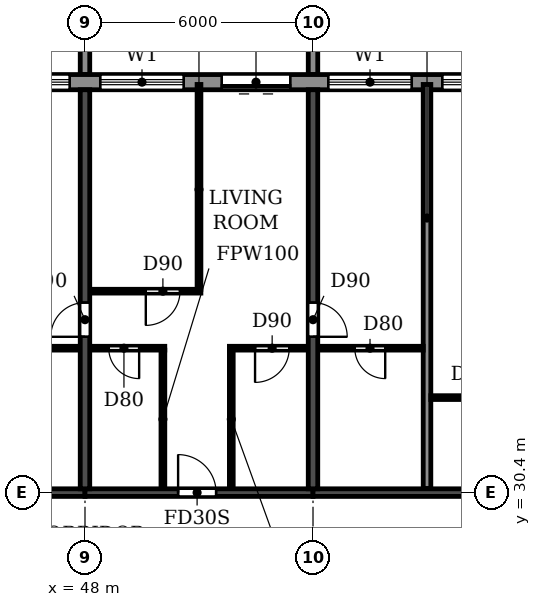
"""IFC4 building model, lengths in metres.
Left out: names, types, materials, properties, quantities, classifications, styles, units other than length and angle.
Written with IfcOpenShell. Run it as: python <this file> out.ifc"""

import sys

from ifc_helpers import new_model, si_unit, direction, frame, frame_2d, origin, place, context, subcontext, project, spatial, polyline, rectangle, outline, extrude, source, transform, mapped, element, fill, save


model = new_model("IFC4")
c1 = context("Model", 3, precision=1e-05, world=origin(), true_north=direction((0.0, 1.0)))
c2 = subcontext(c1, "Body", "Model", "MODEL_VIEW")
j1 = project(units=[si_unit("LENGTHUNIT", "METRE"), si_unit("PLANEANGLEUNIT", "RADIAN")], contexts=[c1])
p1 = place(None, origin())
s1 = spatial("IfcSite", under=j1, at=p1, CompositionType="ELEMENT")
p2 = place(p1, origin())
s2 = spatial("IfcBuilding", under=s1, at=p2, CompositionType="ELEMENT")
p3 = place(p2, frame((0.0, 0.0, 221.4)))
s3 = spatial("IfcBuildingStorey", under=s2, at=p3, CompositionType="ELEMENT", Elevation=221.4)
p4 = place(p3, frame((48.0, 30.5, 0.0), z_axis=(0.0, 0.0, 1.0), x_axis=(0.0, 1.0, 0.0)))
e1 = element("IfcWall", 1, at=p4, inside=s3, PredefinedType="SHEAR", context=c2, shape_type="SweptSolid", body=[
    extrude(rectangle(XDim=10.5, YDim=0.25, at=frame_2d((5.25, 0.0))), origin(), (0.0, 0.0, 1.0), 3.08),
])
p5 = place(p4, frame((4.0, 0.0, 0.0)))
e2 = element("IfcOpeningElement", 2, at=p5, cuts=e1, PredefinedType="OPENING", context=c2, shape_type="SweptSolid", body=[
    extrude(rectangle(XDim=0.9, YDim=2.1, at=frame_2d((0.45, 1.05))), frame((0.0, 0.135, 0.0), z_axis=(0.0, -1.0, 0.0), x_axis=(1.0, 0.0, 0.0)), (0.0, 0.0, 1.0), 0.27),
])
p6 = place(p3, frame((54.0, 30.5, 0.0), z_axis=(0.0, 0.0, 1.0), x_axis=(0.0, 1.0, 0.0)))
e3 = element("IfcWall", 3, at=p6, inside=s3, PredefinedType="SHEAR", context=c2, shape_type="SweptSolid", body=[
    extrude(rectangle(XDim=10.5, YDim=0.25, at=frame_2d((5.25, 0.0))), origin(), (0.0, 0.0, 1.0), 3.08),
])
p7 = place(p6, frame((4.0, 0.0, 0.0)))
e4 = element("IfcOpeningElement", 4, at=p7, cuts=e3, PredefinedType="OPENING", context=c2, shape_type="SweptSolid", body=[
    extrude(rectangle(XDim=0.9, YDim=2.1, at=frame_2d((0.45, 1.05))), frame((0.0, 0.135, 0.0), z_axis=(0.0, -1.0, 0.0), x_axis=(1.0, 0.0, 0.0)), (0.0, 0.0, 1.0), 0.27),
])
p8 = place(p3, frame((42.0, 30.4, 0.0), z_axis=(0.0, 0.0, 1.0), x_axis=(1.0, 0.0, 0.0)))
e5 = element("IfcWall", 5, at=p8, inside=s3, PredefinedType="SHEAR", context=c2, shape_type="SweptSolid", body=[
    extrude(rectangle(XDim=6.0, YDim=0.2, at=frame_2d((3.0, 0.0))), origin(), (0.0, 0.0, 1.0), 2.48),
])
p9 = place(p3, frame((48.0, 30.4, 0.0), z_axis=(0.0, 0.0, 1.0), x_axis=(1.0, 0.0, 0.0)))
e6 = element("IfcWall", 6, at=p9, inside=s3, PredefinedType="SHEAR", context=c2, shape_type="SweptSolid", body=[
    extrude(rectangle(XDim=6.0, YDim=0.2, at=frame_2d((3.0, 0.0))), origin(), (0.0, 0.0, 1.0), 2.48),
])
p10 = place(p9, frame((2.45, 0.0, 0.0)))
e7 = element("IfcOpeningElement", 7, at=p10, cuts=e6, PredefinedType="OPENING", context=c2, shape_type="SweptSolid", body=[
    extrude(rectangle(XDim=1.0, YDim=2.1, at=frame_2d((0.5, 1.05))), frame((0.0, 0.11, 0.0), z_axis=(0.0, -1.0, 0.0), x_axis=(1.0, 0.0, 0.0)), (0.0, 0.0, 1.0), 0.22),
])
p11 = place(p3, frame((54.0, 30.4, 0.0), z_axis=(0.0, 0.0, 1.0), x_axis=(1.0, 0.0, 0.0)))
e8 = element("IfcWall", 8, at=p11, inside=s3, PredefinedType="SHEAR", context=c2, shape_type="SweptSolid", body=[
    extrude(rectangle(XDim=6.0, YDim=0.2, at=frame_2d((3.0, 0.0))), origin(), (0.0, 0.0, 1.0), 2.48),
])
p12 = place(p3, frame((79.317, 41.2, 0.0), z_axis=(0.0, 0.0, 1.0), x_axis=(-1.0, 0.0, 0.0)))
e9 = element("IfcWall", 9, at=p12, inside=s3, PredefinedType="STANDARD", context=c2, shape_type="SweptSolid", body=[
    extrude(rectangle(XDim=56.634, YDim=0.4, at=frame_2d((28.317, 0.0))), origin(), (0.0, 0.0, 1.0), 3.08),
])
p13 = place(p12, frame((52.717, 0.0, 0.9)))
e10 = element("IfcOpeningElement", 10, at=p13, cuts=e9, PredefinedType="OPENING", context=c2, shape_type="SweptSolid", body=[
    extrude(rectangle(XDim=2.2, YDim=1.5, at=frame_2d((1.1, 0.75))), frame((0.0, 0.21, 0.0), z_axis=(0.0, -1.0, 0.0), x_axis=(1.0, 0.0, 0.0)), (0.0, 0.0, 1.0), 0.42),
])
p14 = place(p12, frame((49.717, 0.0, 0.9)))
e11 = element("IfcOpeningElement", 11, at=p14, cuts=e9, PredefinedType="OPENING", context=c2, shape_type="SweptSolid", body=[
    extrude(rectangle(XDim=2.2, YDim=1.5, at=frame_2d((1.1, 0.75))), frame((0.0, 0.21, 0.0), z_axis=(0.0, -1.0, 0.0), x_axis=(1.0, 0.0, 0.0)), (0.0, 0.0, 1.0), 0.42),
])
p15 = place(p12, frame((46.917, 0.0, 0.0)))
e12 = element("IfcOpeningElement", 12, at=p15, cuts=e9, PredefinedType="OPENING", context=c2, shape_type="SweptSolid", body=[
    extrude(rectangle(XDim=1.8, YDim=2.4, at=frame_2d((0.9, 1.2))), frame((0.0, 0.21, 0.0), z_axis=(0.0, -1.0, 0.0), x_axis=(1.0, 0.0, 0.0)), (0.0, 0.0, 1.0), 0.42),
])
p16 = place(p12, frame((43.717, 0.0, 0.9)))
e13 = element("IfcOpeningElement", 13, at=p16, cuts=e9, PredefinedType="OPENING", context=c2, shape_type="SweptSolid", body=[
    extrude(rectangle(XDim=2.2, YDim=1.5, at=frame_2d((1.1, 0.75))), frame((0.0, 0.21, 0.0), z_axis=(0.0, -1.0, 0.0), x_axis=(1.0, 0.0, 0.0)), (0.0, 0.0, 1.0), 0.42),
])
p17 = place(p12, frame((40.717, 0.0, 0.9)))
e14 = element("IfcOpeningElement", 14, at=p17, cuts=e9, PredefinedType="OPENING", context=c2, shape_type="SweptSolid", body=[
    extrude(rectangle(XDim=2.2, YDim=1.5, at=frame_2d((1.1, 0.75))), frame((0.0, 0.21, 0.0), z_axis=(0.0, -1.0, 0.0), x_axis=(1.0, 0.0, 0.0)), (0.0, 0.0, 1.0), 0.42),
])
p18 = place(p12, frame((37.917, 0.0, 0.0)))
e15 = element("IfcOpeningElement", 15, at=p18, cuts=e9, PredefinedType="OPENING", context=c2, shape_type="SweptSolid", body=[
    extrude(rectangle(XDim=1.8, YDim=2.4, at=frame_2d((0.9, 1.2))), frame((0.0, 0.21, 0.0), z_axis=(0.0, -1.0, 0.0), x_axis=(1.0, 0.0, 0.0)), (0.0, 0.0, 1.0), 0.42),
])
p19 = place(p12, frame((34.717, 0.0, 0.9)))
e16 = element("IfcOpeningElement", 16, at=p19, cuts=e9, PredefinedType="OPENING", context=c2, shape_type="SweptSolid", body=[
    extrude(rectangle(XDim=2.2, YDim=1.5, at=frame_2d((1.1, 0.75))), frame((0.0, 0.21, 0.0), z_axis=(0.0, -1.0, 0.0), x_axis=(1.0, 0.0, 0.0)), (0.0, 0.0, 1.0), 0.42),
])
p20 = place(p12, frame((31.717, 0.0, 0.9)))
e17 = element("IfcOpeningElement", 17, at=p20, cuts=e9, PredefinedType="OPENING", context=c2, shape_type="SweptSolid", body=[
    extrude(rectangle(XDim=2.2, YDim=1.5, at=frame_2d((1.1, 0.75))), frame((0.0, 0.21, 0.0), z_axis=(0.0, -1.0, 0.0), x_axis=(1.0, 0.0, 0.0)), (0.0, 0.0, 1.0), 0.42),
])
p21 = place(p12, frame((28.717, 0.0, 0.9)))
e18 = element("IfcOpeningElement", 18, at=p21, cuts=e9, PredefinedType="OPENING", context=c2, shape_type="SweptSolid", body=[
    extrude(rectangle(XDim=2.2, YDim=1.5, at=frame_2d((1.1, 0.75))), frame((0.0, 0.21, 0.0), z_axis=(0.0, -1.0, 0.0), x_axis=(1.0, 0.0, 0.0)), (0.0, 0.0, 1.0), 0.42),
])
p22 = place(p12, frame((25.917, 0.0, 0.0)))
e19 = element("IfcOpeningElement", 19, at=p22, cuts=e9, PredefinedType="OPENING", context=c2, shape_type="SweptSolid", body=[
    extrude(rectangle(XDim=1.8, YDim=2.4, at=frame_2d((0.9, 1.2))), frame((0.0, 0.21, 0.0), z_axis=(0.0, -1.0, 0.0), x_axis=(1.0, 0.0, 0.0)), (0.0, 0.0, 1.0), 0.42),
])
p23 = place(p12, frame((22.717, 0.0, 0.9)))
e20 = element("IfcOpeningElement", 20, at=p23, cuts=e9, PredefinedType="OPENING", context=c2, shape_type="SweptSolid", body=[
    extrude(rectangle(XDim=2.2, YDim=1.5, at=frame_2d((1.1, 0.75))), frame((0.0, 0.21, 0.0), z_axis=(0.0, -1.0, 0.0), x_axis=(1.0, 0.0, 0.0)), (0.0, 0.0, 1.0), 0.42),
])
p24 = place(p12, frame((19.717, 0.0, 0.9)))
e21 = element("IfcOpeningElement", 21, at=p24, cuts=e9, PredefinedType="OPENING", context=c2, shape_type="SweptSolid", body=[
    extrude(rectangle(XDim=2.2, YDim=1.5, at=frame_2d((1.1, 0.75))), frame((0.0, 0.21, 0.0), z_axis=(0.0, -1.0, 0.0), x_axis=(1.0, 0.0, 0.0)), (0.0, 0.0, 1.0), 0.42),
])
p25 = place(p12, frame((16.717, 0.0, 0.9)))
e22 = element("IfcOpeningElement", 22, at=p25, cuts=e9, PredefinedType="OPENING", context=c2, shape_type="SweptSolid", body=[
    extrude(rectangle(XDim=2.2, YDim=1.5, at=frame_2d((1.1, 0.75))), frame((0.0, 0.21, 0.0), z_axis=(0.0, -1.0, 0.0), x_axis=(1.0, 0.0, 0.0)), (0.0, 0.0, 1.0), 0.42),
])
p26 = place(p12, frame((13.917, 0.0, 0.0)))
e23 = element("IfcOpeningElement", 23, at=p26, cuts=e9, PredefinedType="OPENING", context=c2, shape_type="SweptSolid", body=[
    extrude(rectangle(XDim=1.8, YDim=2.4, at=frame_2d((0.9, 1.2))), frame((0.0, 0.21, 0.0), z_axis=(0.0, -1.0, 0.0), x_axis=(1.0, 0.0, 0.0)), (0.0, 0.0, 1.0), 0.42),
])
p27 = place(p12, frame((10.717, 0.0, 0.9)))
e24 = element("IfcOpeningElement", 24, at=p27, cuts=e9, PredefinedType="OPENING", context=c2, shape_type="SweptSolid", body=[
    extrude(rectangle(XDim=2.2, YDim=1.5, at=frame_2d((1.1, 0.75))), frame((0.0, 0.21, 0.0), z_axis=(0.0, -1.0, 0.0), x_axis=(1.0, 0.0, 0.0)), (0.0, 0.0, 1.0), 0.42),
])
p28 = place(p12, frame((7.917, 0.0, 0.0)))
e25 = element("IfcOpeningElement", 25, at=p28, cuts=e9, PredefinedType="OPENING", context=c2, shape_type="SweptSolid", body=[
    extrude(rectangle(XDim=1.8, YDim=2.4, at=frame_2d((0.9, 1.2))), frame((0.0, 0.21, 0.0), z_axis=(0.0, -1.0, 0.0), x_axis=(1.0, 0.0, 0.0)), (0.0, 0.0, 1.0), 0.42),
])
p29 = place(p12, frame((4.717, 0.0, 0.9)))
e26 = element("IfcOpeningElement", 26, at=p29, cuts=e9, PredefinedType="OPENING", context=c2, shape_type="SweptSolid", body=[
    extrude(rectangle(XDim=2.2, YDim=1.5, at=frame_2d((1.1, 0.75))), frame((0.0, 0.21, 0.0), z_axis=(0.0, -1.0, 0.0), x_axis=(1.0, 0.0, 0.0)), (0.0, 0.0, 1.0), 0.42),
])
p30 = place(p12, frame((1.917, 0.0, 0.0)))
e27 = element("IfcOpeningElement", 27, at=p30, cuts=e9, PredefinedType="OPENING", context=c2, shape_type="SweptSolid", body=[
    extrude(rectangle(XDim=1.8, YDim=2.4, at=frame_2d((0.9, 1.2))), frame((0.0, 0.21, 0.0), z_axis=(0.0, -1.0, 0.0), x_axis=(1.0, 0.0, 0.0)), (0.0, 0.0, 1.0), 0.42),
])
m1 = source(origin(), c2, "Body", "SweptSolid", [
    extrude(outline(polyline([(0.0, 0.0), (0.25, 0.0), (0.25, 3.1), (0.0, 3.1), (0.0, 0.0)])), origin(), (0.0, 0.0, 1.0), 3.1),
])
for number, where in (
    (28, (47.875, 41.4, 0.0)),
    (29, (53.875, 41.4, 0.0)),
):
    element("IfcWall", number, at=place(p3, frame(where)), inside=s3, PredefinedType="STANDARD", context=c2, shape_type="MappedRepresentation", body=[
        mapped(m1, transform((0.0, 0.0, 0.0))),
    ])
p31 = place(p3, frame((57.0, 30.51, 0.0), z_axis=(0.0, 0.0, 1.0), x_axis=(0.0, 1.0, 0.0)))
e30 = element("IfcWall", 30, at=p31, inside=s3, PredefinedType="PARTITIONING", context=c2, shape_type="SweptSolid", body=[
    extrude(rectangle(XDim=10.63, YDim=0.2, at=frame_2d((5.315, 0.0))), origin(), (0.0, 0.0, 1.0), 3.08),
])
p32 = place(p3, frame((57.1, 32.9, 0.0), z_axis=(0.0, 0.0, 1.0), x_axis=(1.0, 0.0, 0.0)))
e31 = element("IfcWall", 31, at=p32, inside=s3, PredefinedType="PARTITIONING", context=c2, shape_type="SweptSolid", body=[
    extrude(rectangle(XDim=2.765, YDim=0.1, at=frame_2d((1.382, 0.0))), origin(), (0.0, 0.0, 1.0), 3.08),
])
p33 = place(p32, frame((1.0, 0.0, 0.0)))
e32 = element("IfcOpeningElement", 32, at=p33, cuts=e31, PredefinedType="OPENING", context=c2, shape_type="SweptSolid", body=[
    extrude(rectangle(XDim=0.8, YDim=2.1, at=frame_2d((0.4, 1.05))), frame((0.0, 0.06, 0.0), z_axis=(0.0, -1.0, 0.0), x_axis=(1.0, 0.0, 0.0)), (0.0, 0.0, 1.0), 0.12),
])
p34 = place(p3, frame((45.1, 34.2, 0.0), z_axis=(0.0, 0.0, 1.0), x_axis=(1.0, 0.0, 0.0)))
e33 = element("IfcWall", 33, at=p34, inside=s3, PredefinedType="PARTITIONING", context=c2, shape_type="SweptSolid", body=[
    extrude(rectangle(XDim=2.765, YDim=0.1, at=frame_2d((1.382, 0.0))), origin(), (0.0, 0.0, 1.0), 3.08),
])
p35 = place(p34, frame((1.0, 0.0, 0.0)))
e34 = element("IfcOpeningElement", 34, at=p35, cuts=e33, PredefinedType="OPENING", context=c2, shape_type="SweptSolid", body=[
    extrude(rectangle(XDim=0.8, YDim=2.1, at=frame_2d((0.4, 1.05))), frame((0.0, 0.06, 0.0), z_axis=(0.0, -1.0, 0.0), x_axis=(1.0, 0.0, 0.0)), (0.0, 0.0, 1.0), 0.12),
])
p36 = place(p3, frame((48.135, 34.2, 0.0), z_axis=(0.0, 0.0, 1.0), x_axis=(1.0, 0.0, 0.0)))
e35 = element("IfcWall", 35, at=p36, inside=s3, PredefinedType="PARTITIONING", context=c2, shape_type="SweptSolid", body=[
    extrude(rectangle(XDim=1.965, YDim=0.1, at=frame_2d((0.982, 0.0))), origin(), (0.0, 0.0, 1.0), 3.08),
])
p37 = place(p36, frame((0.49, 0.0, 0.0)))
e36 = element("IfcOpeningElement", 36, at=p37, cuts=e35, PredefinedType="OPENING", context=c2, shape_type="SweptSolid", body=[
    extrude(rectangle(XDim=0.8, YDim=2.1, at=frame_2d((0.4, 1.05))), frame((0.0, 0.06, 0.0), z_axis=(0.0, -1.0, 0.0), x_axis=(1.0, 0.0, 0.0)), (0.0, 0.0, 1.0), 0.12),
])
p38 = place(p3, frame((51.8, 34.2, 0.0), z_axis=(0.0, 0.0, 1.0), x_axis=(1.0, 0.0, 0.0)))
e37 = element("IfcWall", 37, at=p38, inside=s3, PredefinedType="PARTITIONING", context=c2, shape_type="SweptSolid", body=[
    extrude(rectangle(XDim=2.065, YDim=0.1, at=frame_2d((1.032, 0.0))), origin(), (0.0, 0.0, 1.0), 3.08),
])
p39 = place(p38, frame((0.675, 0.0, 0.0)))
e38 = element("IfcOpeningElement", 38, at=p39, cuts=e37, PredefinedType="OPENING", context=c2, shape_type="SweptSolid", body=[
    extrude(rectangle(XDim=0.9, YDim=2.1, at=frame_2d((0.45, 1.05))), frame((0.0, 0.06, 0.0), z_axis=(0.0, -1.0, 0.0), x_axis=(1.0, 0.0, 0.0)), (0.0, 0.0, 1.0), 0.12),
])
p40 = place(p3, frame((54.135, 34.2, 0.0), z_axis=(0.0, 0.0, 1.0), x_axis=(1.0, 0.0, 0.0)))
e39 = element("IfcWall", 39, at=p40, inside=s3, PredefinedType="PARTITIONING", context=c2, shape_type="SweptSolid", body=[
    extrude(rectangle(XDim=2.765, YDim=0.1, at=frame_2d((1.382, 0.0))), origin(), (0.0, 0.0, 1.0), 3.08),
])
p41 = place(p40, frame((0.965, 0.0, 0.0)))
e40 = element("IfcOpeningElement", 40, at=p41, cuts=e39, PredefinedType="OPENING", context=c2, shape_type="SweptSolid", body=[
    extrude(rectangle(XDim=0.8, YDim=2.1, at=frame_2d((0.4, 1.05))), frame((0.0, 0.06, 0.0), z_axis=(0.0, -1.0, 0.0), x_axis=(1.0, 0.0, 0.0)), (0.0, 0.0, 1.0), 0.12),
])
p42 = place(p3, frame((48.135, 35.7, 0.0), z_axis=(0.0, 0.0, 1.0), x_axis=(1.0, 0.0, 0.0)))
e41 = element("IfcWall", 41, at=p42, inside=s3, PredefinedType="PARTITIONING", context=c2, shape_type="SweptSolid", body=[
    extrude(rectangle(XDim=2.915, YDim=0.1, at=frame_2d((1.458, 0.0))), origin(), (0.0, 0.0, 1.0), 3.08),
])
p43 = place(p42, frame((1.465, 0.0, 0.0)))
e42 = element("IfcOpeningElement", 42, at=p43, cuts=e41, PredefinedType="OPENING", context=c2, shape_type="SweptSolid", body=[
    extrude(rectangle(XDim=0.9, YDim=2.1, at=frame_2d((0.45, 1.05))), frame((0.0, 0.06, 0.0), z_axis=(0.0, -1.0, 0.0), x_axis=(1.0, 0.0, 0.0)), (0.0, 0.0, 1.0), 0.12),
])
p44 = place(p3, frame((50.05, 30.51, 0.0), z_axis=(0.0, 0.0, 1.0), x_axis=(0.0, 1.0, 0.0)))
e43 = element("IfcWall", 43, at=p44, inside=s3, PredefinedType="PARTITIONING", context=c2, shape_type="SweptSolid", body=[
    extrude(rectangle(XDim=3.64, YDim=0.1, at=frame_2d((1.82, 0.0))), origin(), (0.0, 0.0, 1.0), 3.08),
])
p45 = place(p3, frame((51.0, 35.75, 0.0), z_axis=(0.0, 0.0, 1.0), x_axis=(0.0, 1.0, 0.0)))
e44 = element("IfcWall", 44, at=p45, inside=s3, PredefinedType="PARTITIONING", context=c2, shape_type="SweptSolid", body=[
    extrude(rectangle(XDim=5.39, YDim=0.1, at=frame_2d((2.695, 0.0))), origin(), (0.0, 0.0, 1.0), 3.08),
])
p46 = place(p3, frame((51.85, 30.51, 0.0), z_axis=(0.0, 0.0, 1.0), x_axis=(0.0, 1.0, 0.0)))
e45 = element("IfcWall", 45, at=p46, inside=s3, PredefinedType="PARTITIONING", context=c2, shape_type="SweptSolid", body=[
    extrude(rectangle(XDim=3.64, YDim=0.1, at=frame_2d((1.82, 0.0))), origin(), (0.0, 0.0, 1.0), 3.08),
])
p47 = place(p20, origin())
e46 = element("IfcWindow", 46, at=p47, inside=s3, PartitioningType="DOUBLE_PANEL_HORIZONTAL", PredefinedType="WINDOW", context=c2, shape_type="SweptSolid", body=[
    extrude(rectangle(XDim=2.2, YDim=1.5, at=frame_2d((1.1, 0.75))), frame((0.0, 0.03, 0.0), z_axis=(0.0, -1.0, 0.0), x_axis=(1.0, 0.0, 0.0)), (0.0, 0.0, 1.0), 0.06),
])
fill(e17, e46)
p48 = place(p21, origin())
e47 = element("IfcWindow", 47, at=p48, inside=s3, PartitioningType="DOUBLE_PANEL_HORIZONTAL", PredefinedType="WINDOW", context=c2, shape_type="SweptSolid", body=[
    extrude(rectangle(XDim=2.2, YDim=1.5, at=frame_2d((1.1, 0.75))), frame((0.0, 0.03, 0.0), z_axis=(0.0, -1.0, 0.0), x_axis=(1.0, 0.0, 0.0)), (0.0, 0.0, 1.0), 0.06),
])
fill(e18, e47)
p49 = place(p22, origin())
e48 = element("IfcDoor", 48, at=p49, inside=s3, OperationType="DOUBLE_DOOR_SLIDING", PredefinedType="DOOR", context=c2, shape_type="SweptSolid", body=[
    extrude(rectangle(XDim=1.8, YDim=2.4, at=frame_2d((0.9, 1.2))), frame((0.0, 0.025, 0.0), z_axis=(0.0, -1.0, 0.0), x_axis=(1.0, 0.0, 0.0)), (0.0, 0.0, 1.0), 0.05),
])
fill(e19, e48)
p50 = place(p23, origin())
e49 = element("IfcWindow", 49, at=p50, inside=s3, PartitioningType="DOUBLE_PANEL_HORIZONTAL", PredefinedType="WINDOW", context=c2, shape_type="SweptSolid", body=[
    extrude(rectangle(XDim=2.2, YDim=1.5, at=frame_2d((1.1, 0.75))), frame((0.0, 0.03, 0.0), z_axis=(0.0, -1.0, 0.0), x_axis=(1.0, 0.0, 0.0)), (0.0, 0.0, 1.0), 0.06),
])
fill(e20, e49)
p51 = place(p24, origin())
e50 = element("IfcWindow", 50, at=p51, inside=s3, PartitioningType="DOUBLE_PANEL_HORIZONTAL", PredefinedType="WINDOW", context=c2, shape_type="SweptSolid", body=[
    extrude(rectangle(XDim=2.2, YDim=1.5, at=frame_2d((1.1, 0.75))), frame((0.0, 0.03, 0.0), z_axis=(0.0, -1.0, 0.0), x_axis=(1.0, 0.0, 0.0)), (0.0, 0.0, 1.0), 0.06),
])
fill(e21, e50)
p52 = place(p41, frame((0.8, 0.0, 0.0), z_axis=(0.0, 0.0, 1.0), x_axis=(-1.0, 0.0, 0.0)))
e51 = element("IfcDoor", 51, at=p52, inside=s3, OperationType="SINGLE_SWING_LEFT", PredefinedType="DOOR", context=c2, shape_type="SweptSolid", body=[
    extrude(rectangle(XDim=0.8, YDim=2.1, at=frame_2d((0.4, 1.05))), frame((0.0, 0.025, 0.0), z_axis=(0.0, -1.0, 0.0), x_axis=(1.0, 0.0, 0.0)), (0.0, 0.0, 1.0), 0.05),
])
fill(e40, e51)
p53 = place(p5, origin())
e52 = element("IfcDoor", 52, at=p53, inside=s3, OperationType="SINGLE_SWING_LEFT", PredefinedType="DOOR", context=c2, shape_type="SweptSolid", body=[
    extrude(rectangle(XDim=0.9, YDim=2.1, at=frame_2d((0.45, 1.05))), frame((0.0, 0.025, 0.0), z_axis=(0.0, -1.0, 0.0), x_axis=(1.0, 0.0, 0.0)), (0.0, 0.0, 1.0), 0.05),
])
fill(e2, e52)
p54 = place(p37, frame((0.8, 0.0, 0.0), z_axis=(0.0, 0.0, 1.0), x_axis=(-1.0, 0.0, 0.0)))
e53 = element("IfcDoor", 53, at=p54, inside=s3, OperationType="SINGLE_SWING_LEFT", PredefinedType="DOOR", context=c2, shape_type="SweptSolid", body=[
    extrude(rectangle(XDim=0.8, YDim=2.1, at=frame_2d((0.4, 1.05))), frame((0.0, 0.025, 0.0), z_axis=(0.0, -1.0, 0.0), x_axis=(1.0, 0.0, 0.0)), (0.0, 0.0, 1.0), 0.05),
])
fill(e36, e53)
p55 = place(p43, frame((0.9, 0.0, 0.0), z_axis=(0.0, 0.0, 1.0), x_axis=(-1.0, 0.0, 0.0)))
e54 = element("IfcDoor", 54, at=p55, inside=s3, OperationType="SINGLE_SWING_RIGHT", PredefinedType="DOOR", context=c2, shape_type="SweptSolid", body=[
    extrude(rectangle(XDim=0.9, YDim=2.1, at=frame_2d((0.45, 1.05))), frame((0.0, 0.025, 0.0), z_axis=(0.0, -1.0, 0.0), x_axis=(1.0, 0.0, 0.0)), (0.0, 0.0, 1.0), 0.05),
])
fill(e42, e54)
p56 = place(p10, origin())
e55 = element("IfcDoor", 55, at=p56, inside=s3, OperationType="SINGLE_SWING_LEFT", PredefinedType="DOOR", context=c2, shape_type="SweptSolid", body=[
    extrude(rectangle(XDim=1.0, YDim=2.1, at=frame_2d((0.5, 1.05))), frame((0.0, 0.025, 0.0), z_axis=(0.0, -1.0, 0.0), x_axis=(1.0, 0.0, 0.0)), (0.0, 0.0, 1.0), 0.05),
])
fill(e7, e55)
p57 = place(p39, frame((0.9, 0.0, 0.0), z_axis=(0.0, 0.0, 1.0), x_axis=(-1.0, 0.0, 0.0)))
e56 = element("IfcDoor", 56, at=p57, inside=s3, OperationType="SINGLE_SWING_RIGHT", PredefinedType="DOOR", context=c2, shape_type="SweptSolid", body=[
    extrude(rectangle(XDim=0.9, YDim=2.1, at=frame_2d((0.45, 1.05))), frame((0.0, 0.025, 0.0), z_axis=(0.0, -1.0, 0.0), x_axis=(1.0, 0.0, 0.0)), (0.0, 0.0, 1.0), 0.05),
])
fill(e38, e56)
p58 = place(p7, frame((0.9, 0.0, 0.0), z_axis=(0.0, 0.0, 1.0), x_axis=(-1.0, 0.0, 0.0)))
e57 = element("IfcDoor", 57, at=p58, inside=s3, OperationType="SINGLE_SWING_RIGHT", PredefinedType="DOOR", context=c2, shape_type="SweptSolid", body=[
    extrude(rectangle(XDim=0.9, YDim=2.1, at=frame_2d((0.45, 1.05))), frame((0.0, 0.025, 0.0), z_axis=(0.0, -1.0, 0.0), x_axis=(1.0, 0.0, 0.0)), (0.0, 0.0, 1.0), 0.05),
])
fill(e4, e57)
save(model, sys.argv[1])
